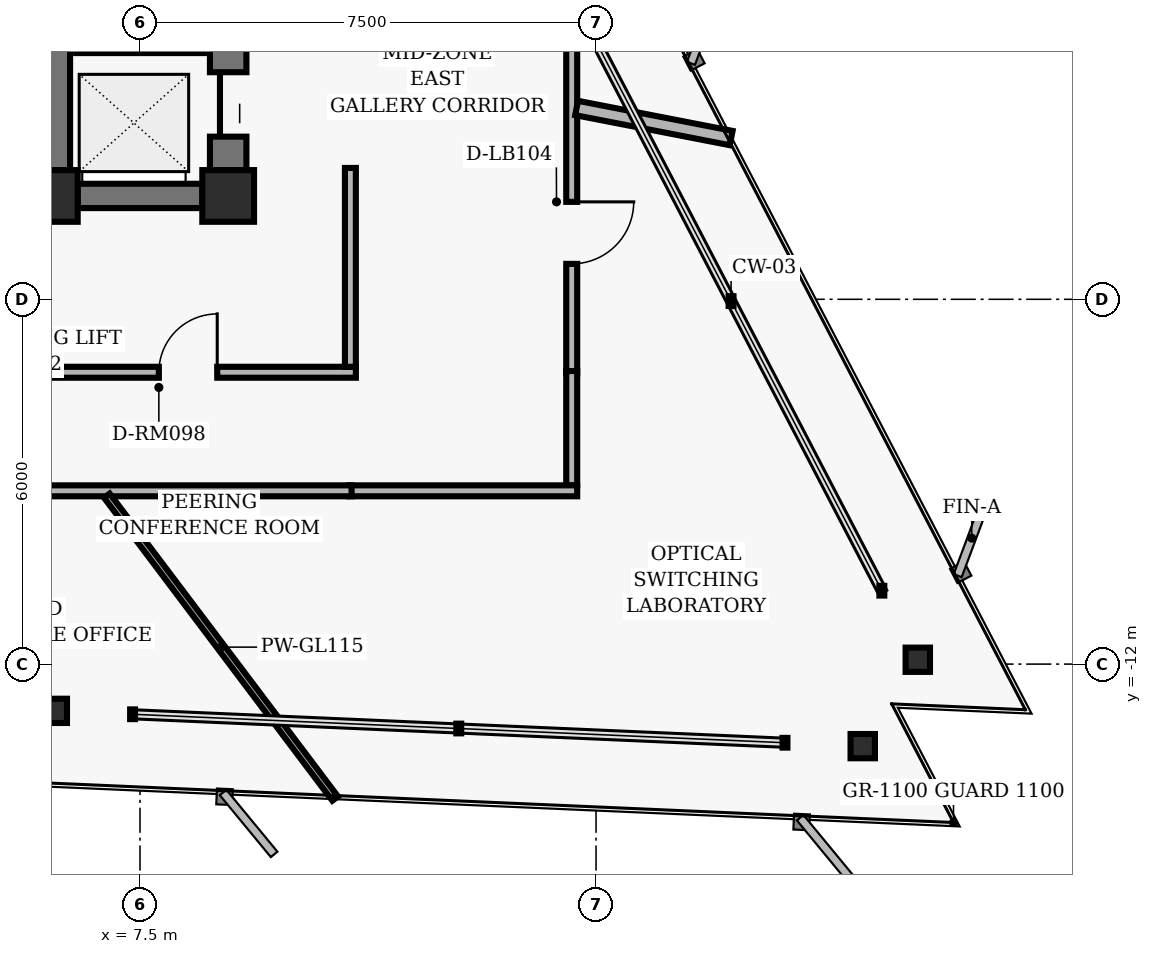
"""IFC4 building model, lengths in metres.
Left out: names, types, materials, properties, quantities, classifications, styles, units other than length and angle.
Written with IfcOpenShell. Run it as: python <this file> out.ifc"""

import sys

from ifc_helpers import new_model, si_unit, direction, frame, frame_2d, origin, origin_2d, place, context, subcontext, project, spatial, rectangle, hollow_rectangle, i_section, extrude, element, fill, save


model = new_model("IFC4")
c1 = context("Model", 3, precision=1e-05, world=origin(), true_north=direction((0.0, 1.0)))
c2 = subcontext(c1, "Body", "Model", "MODEL_VIEW")
j1 = project(units=[si_unit("LENGTHUNIT", "METRE"), si_unit("PLANEANGLEUNIT", "RADIAN")], contexts=[c1])
p1 = place(None, origin())
s1 = spatial("IfcSite", under=j1, at=p1, CompositionType="ELEMENT")
p2 = place(p1, origin())
s2 = spatial("IfcBuilding", under=s1, at=p2, CompositionType="ELEMENT")
p3 = place(p2, frame((0.0, 0.0, 141.12)))
s3 = spatial("IfcBuildingStorey", under=s2, at=p3, CompositionType="ELEMENT", Elevation=141.12)
for number, where, z_axis, x_axis in (
    (1, (6.05, -4.3, 0.0), (0.0, 0.0, 1.0), (1.0, 0.0, 0.0)),
    (2, (8.95, -4.3, 0.0), (0.0, 0.0, 1.0), (1.0, 0.0, 0.0)),
):
    element("IfcColumn", number, at=place(p3, frame(where, z_axis=z_axis, x_axis=x_axis)), inside=s3, PredefinedType="COLUMN", context=c2, shape_type="SweptSolid", body=[
        extrude(hollow_rectangle(XDim=0.85, YDim=0.85, WallThickness=0.055, InnerFilletRadius=0.02, OuterFilletRadius=0.04, at=origin_2d()), origin(), (0.0, 0.0, 1.0), 3.04),
    ])
p4 = place(p3, frame((6.05, -3.875, 0.0), z_axis=(0.0, 0.0, 1.0), x_axis=(0.0, 1.0, 0.0)))
e3 = element("IfcWall", 3, at=p4, inside=s3, PredefinedType="SHEAR", context=c2, shape_type="SweptSolid", body=[
    extrude(rectangle(XDim=3.45, YDim=0.6, at=frame_2d((1.725, 0.0))), origin(), (0.0, 0.0, 1.0), 2.788),
])
p5 = place(p3, frame((8.95, -3.875, 0.0), z_axis=(0.0, 0.0, 1.0), x_axis=(0.0, 1.0, 0.0)))
e4 = element("IfcWall", 4, at=p5, inside=s3, PredefinedType="SHEAR", context=c2, shape_type="SweptSolid", body=[
    extrude(rectangle(XDim=7.95, YDim=0.6, at=frame_2d((3.975, 0.0))), origin(), (0.0, 0.0, 1.0), 2.788),
])
p6 = place(p5, frame((0.55, 0.0, 0.0)))
e5 = element("IfcOpeningElement", 5, at=p6, cuts=e4, PredefinedType="OPENING", context=c2, shape_type="SweptSolid", body=[
    extrude(rectangle(XDim=1.06, YDim=2.04, at=frame_2d((0.53, 1.02))), frame((0.0, 0.31, 0.0), z_axis=(0.0, -1.0, 0.0), x_axis=(1.0, 0.0, 0.0)), (0.0, 0.0, 1.0), 0.62),
])
p7 = place(p5, frame((3.445, 0.0, 0.0)))
e6 = element("IfcOpeningElement", 6, at=p7, cuts=e4, PredefinedType="OPENING", context=c2, shape_type="SweptSolid", body=[
    extrude(rectangle(XDim=1.06, YDim=2.04, at=frame_2d((0.53, 1.02))), frame((0.0, 0.31, 0.0), z_axis=(0.0, -1.0, 0.0), x_axis=(1.0, 0.0, 0.0)), (0.0, 0.0, 1.0), 0.62),
])
p8 = place(p5, frame((6.33, 0.0, 0.0)))
e7 = element("IfcOpeningElement", 7, at=p8, cuts=e4, PredefinedType="OPENING", context=c2, shape_type="SweptSolid", body=[
    extrude(rectangle(XDim=1.06, YDim=2.04, at=frame_2d((0.53, 1.02))), frame((0.0, 0.31, 0.0), z_axis=(0.0, -1.0, 0.0), x_axis=(1.0, 0.0, 0.0)), (0.0, 0.0, 1.0), 0.62),
])
p9 = place(p3, frame((6.475, -4.3, 0.0), z_axis=(0.0, 0.0, 1.0), x_axis=(1.0, 0.0, 0.0)))
e8 = element("IfcWall", 8, at=p9, inside=s3, PredefinedType="SHEAR", context=c2, shape_type="SweptSolid", body=[
    extrude(rectangle(XDim=2.05, YDim=0.4, at=frame_2d((1.025, 0.0))), origin(), (0.0, 0.0, 1.0), 2.788),
])
for number, where, z_axis, x_axis in (
    (9, (20.292, -11.928, 0.0), (0.0, 0.0, 1.0), (1.0, 0.0, 0.0)),
    (10, (6.099, -12.769, 0.0), (0.0, 0.0, 1.0), (1.0, 0.0, 0.0)),
    (11, (19.386, -13.349, 0.0), (0.0, 0.0, 1.0), (1.0, 0.0, 0.0)),
):
    element("IfcColumn", number, at=place(p3, frame(where, z_axis=z_axis, x_axis=x_axis)), inside=s3, PredefinedType="COLUMN", context=c2, shape_type="SweptSolid", body=[
        extrude(i_section(OverallWidth=0.401, OverallDepth=0.399, WebThickness=0.025, FlangeThickness=0.04, FilletRadius=0.018, at=origin_2d()), origin(), (0.0, 0.0, 1.0), 3.04),
    ])
p10 = place(p3, frame((6.45, -1.85, 0.0), z_axis=(0.0, 0.0, 1.0), x_axis=(1.0, 0.0, 0.0)))
e12 = element("IfcWall", 12, at=p10, inside=s3, PredefinedType="PARTITIONING", context=c2, shape_type="SweptSolid", body=[
    extrude(rectangle(XDim=2.1, YDim=0.2, at=frame_2d((1.05, 0.0))), origin(), (0.0, 0.0, 1.0), 2.763),
])
p11 = place(p3, frame((14.6, 0.26, 0.0), z_axis=(0.0, 0.0, 1.0), x_axis=(0.0, -1.0, 0.0)))
e13 = element("IfcWall", 13, at=p11, inside=s3, PredefinedType="PARTITIONING", context=c2, shape_type="SweptSolid", body=[
    extrude(rectangle(XDim=7.479, YDim=0.18, at=frame_2d((3.74, 0.0))), origin(), (0.0, 0.0, 1.0), 2.763),
])
p12 = place(p11, frame((4.657, 0.0, 0.0)))
e14 = element("IfcOpeningElement", 14, at=p12, cuts=e13, PredefinedType="OPENING", context=c2, shape_type="SweptSolid", body=[
    extrude(rectangle(XDim=1.02, YDim=2.02, at=frame_2d((0.51, 1.01))), frame((0.0, 0.1, 0.0), z_axis=(0.0, -1.0, 0.0), x_axis=(1.0, 0.0, 0.0)), (0.0, 0.0, 1.0), 0.2),
])
p13 = place(p3, frame((14.6, -7.18, 0.0), z_axis=(0.0, 0.0, 1.0), x_axis=(0.0, -1.0, 0.0)))
e15 = element("IfcWall", 15, at=p13, inside=s3, PredefinedType="PARTITIONING", context=c2, shape_type="SweptSolid", body=[
    extrude(rectangle(XDim=1.88, YDim=0.18, at=frame_2d((0.94, 0.0))), origin(), (0.0, 0.0, 1.0), 2.763),
])
p14 = place(p3, frame((14.69, -9.15, 0.0), z_axis=(0.0, 0.0, 1.0), x_axis=(-1.0, 0.0, 0.0)))
e16 = element("IfcWall", 16, at=p14, inside=s3, PredefinedType="PARTITIONING", context=c2, shape_type="SweptSolid", body=[
    extrude(rectangle(XDim=3.75, YDim=0.18, at=frame_2d((1.875, 0.0))), origin(), (0.0, 0.0, 1.0), 2.33),
])
p15 = place(p3, frame((10.98, -9.15, 0.0), z_axis=(0.0, 0.0, 1.0), x_axis=(-1.0, 0.0, 0.0)))
e17 = element("IfcWall", 17, at=p15, inside=s3, PredefinedType="PARTITIONING", context=c2, shape_type="SweptSolid", body=[
    extrude(rectangle(XDim=17.5, YDim=0.18, at=frame_2d((8.75, 0.0))), origin(), (0.0, 0.0, 1.0), 2.33),
])
p16 = place(p15, frame((13.872, 0.0, 0.0)))
e18 = element("IfcOpeningElement", 18, at=p16, cuts=e17, PredefinedType="OPENING", context=c2, shape_type="SweptSolid", body=[
    extrude(rectangle(XDim=0.96, YDim=2.02, at=frame_2d((0.48, 1.01))), frame((0.0, 0.1, 0.0), z_axis=(0.0, -1.0, 0.0), x_axis=(1.0, 0.0, 0.0)), (0.0, 0.0, 1.0), 0.2),
])
p17 = place(p15, frame((7.256, 0.0, 0.0)))
e19 = element("IfcOpeningElement", 19, at=p17, cuts=e17, PredefinedType="OPENING", context=c2, shape_type="SweptSolid", body=[
    extrude(rectangle(XDim=0.96, YDim=2.02, at=frame_2d((0.48, 1.01))), frame((0.0, 0.1, 0.0), z_axis=(0.0, -1.0, 0.0), x_axis=(1.0, 0.0, 0.0)), (0.0, 0.0, 1.0), 0.2),
])
p18 = place(p3, frame((5.53, -7.2, 0.0), z_axis=(0.0, 0.0, 1.0), x_axis=(1.0, 0.0, 0.0)))
e20 = element("IfcWall", 20, at=p18, inside=s3, PredefinedType="PARTITIONING", context=c2, shape_type="SweptSolid", body=[
    extrude(rectangle(XDim=5.52, YDim=0.18, at=frame_2d((2.76, 0.0))), origin(), (0.0, 0.0, 1.0), 2.33),
])
p19 = place(p18, frame((2.28, 0.0, 0.0)))
e21 = element("IfcOpeningElement", 21, at=p19, cuts=e20, PredefinedType="OPENING", context=c2, shape_type="SweptSolid", body=[
    extrude(rectangle(XDim=0.96, YDim=2.02, at=frame_2d((0.48, 1.01))), frame((0.0, 0.1, 0.0), z_axis=(0.0, -1.0, 0.0), x_axis=(1.0, 0.0, 0.0)), (0.0, 0.0, 1.0), 0.2),
])
p20 = place(p3, frame((10.96, -7.11, 0.0), z_axis=(0.0, 0.0, 1.0), x_axis=(0.0, 1.0, 0.0)))
e22 = element("IfcWall", 22, at=p20, inside=s3, PredefinedType="PARTITIONING", context=c2, shape_type="SweptSolid", body=[
    extrude(rectangle(XDim=3.271, YDim=0.18, at=frame_2d((1.635, 0.0))), origin(), (0.0, 0.0, 1.0), 2.763),
])
p21 = place(p3, frame((6.955, -9.23, 0.0), z_axis=(0.0, 0.0, 1.0), x_axis=(0.60180827309, -0.79864059654, 0.0)))
e23 = element("IfcWall", 23, at=p21, inside=s3, PredefinedType="MOVABLE", context=c2, shape_type="SweptSolid", body=[
    extrude(rectangle(XDim=6.238, YDim=0.115, at=frame_2d((3.119, 0.0))), origin(), (0.0, 0.0, 1.0), 2.763),
])
p22 = place(p3, frame((14.68, -2.854, 0.0), z_axis=(0.0, 0.0, 1.0), x_axis=(0.9816178422, -0.190857045651, 0.0)))
e24 = element("IfcWall", 24, at=p22, inside=s3, PredefinedType="PARTITIONING", context=c2, shape_type="SweptSolid", body=[
    extrude(rectangle(XDim=2.59, YDim=0.24, at=frame_2d((1.295, 0.0))), origin(), (0.0, 0.0, 1.0), 2.763),
])
p23 = place(p6, origin())
e25 = element("IfcDoor", 25, at=p23, inside=s3, OperationType="SLIDING_TO_LEFT", PredefinedType="DOOR", context=c2, shape_type="SweptSolid", body=[
    extrude(rectangle(XDim=1.06, YDim=2.04, at=frame_2d((0.53, 1.02))), frame((0.0, 0.025, 0.0), z_axis=(0.0, -1.0, 0.0), x_axis=(1.0, 0.0, 0.0)), (0.0, 0.0, 1.0), 0.05),
])
fill(e5, e25)
p24 = place(p19, origin())
e26 = element("IfcDoor", 26, at=p24, inside=s3, OperationType="SINGLE_SWING_RIGHT", PredefinedType="DOOR", context=c2, shape_type="SweptSolid", body=[
    extrude(rectangle(XDim=0.96, YDim=2.02, at=frame_2d((0.48, 1.01))), frame((0.0, 0.025, 0.0), z_axis=(0.0, -1.0, 0.0), x_axis=(1.0, 0.0, 0.0)), (0.0, 0.0, 1.0), 0.05),
])
fill(e21, e26)
p25 = place(p12, origin())
e27 = element("IfcDoor", 27, at=p25, inside=s3, OperationType="SINGLE_SWING_LEFT", PredefinedType="DOOR", context=c2, shape_type="SweptSolid", body=[
    extrude(rectangle(XDim=1.02, YDim=2.02, at=frame_2d((0.51, 1.01))), frame((0.0, 0.025, 0.0), z_axis=(0.0, -1.0, 0.0), x_axis=(1.0, 0.0, 0.0)), (0.0, 0.0, 1.0), 0.05),
])
fill(e14, e27)
save(model, sys.argv[1])
